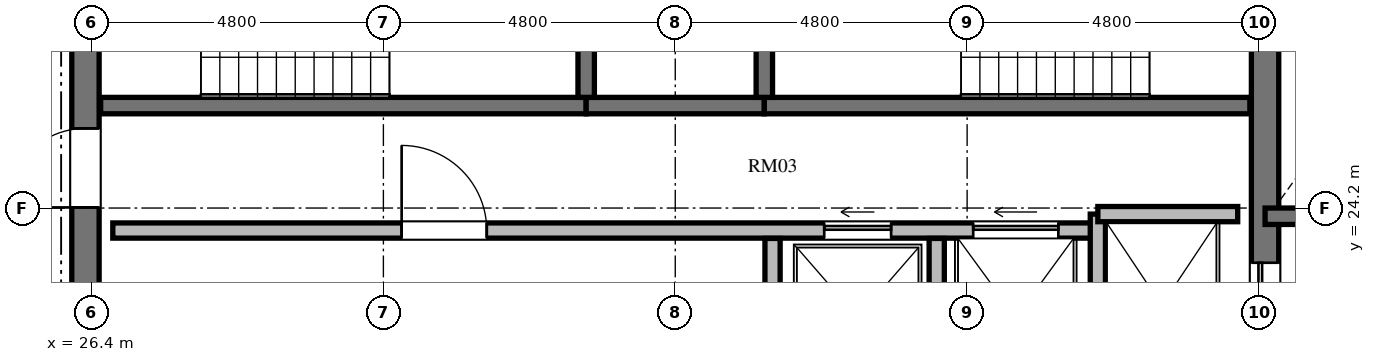
"""IFC4 building model, lengths in metres.
Left out: names, types, materials, properties, quantities, classifications, styles, units other than length and angle.
Written with IfcOpenShell. Run it as: python <this file> out.ifc"""

import sys

from ifc_helpers import new_model, si_unit, direction, frame, frame_2d, origin, place, context, subcontext, project, spatial, rectangle, extrude, element, fill, save


model = new_model("IFC4")
c1 = context("Model", 3, precision=1e-05, world=origin(), true_north=direction((0.0, 1.0)))
c2 = subcontext(c1, "Body", "Model", "MODEL_VIEW")
j1 = project(units=[si_unit("LENGTHUNIT", "METRE"), si_unit("PLANEANGLEUNIT", "RADIAN")], contexts=[c1])
p1 = place(None, origin())
s1 = spatial("IfcSite", under=j1, at=p1, CompositionType="ELEMENT")
p2 = place(p1, origin())
s2 = spatial("IfcBuilding", under=s1, at=p2, CompositionType="ELEMENT")
p3 = place(p2, frame((0.0, 0.0, 242.256)))
s3 = spatial("IfcBuildingStorey", under=s2, at=p3, CompositionType="ELEMENT", Elevation=242.256)
p4 = place(p3, frame((26.3, 20.95, 0.0), z_axis=(0.0, 0.0, 1.0), x_axis=(0.0, 1.0, 0.0)))
e1 = element("IfcWall", 1, at=p4, inside=s3, PredefinedType="SHEAR", context=c2, shape_type="SweptSolid", body=[
    extrude(rectangle(XDim=14.1, YDim=0.45, at=frame_2d((7.05, 0.0))), origin(), (0.0, 0.0, 1.0), 3.648),
])
p5 = place(p4, frame((6.5, 0.0, 0.0)))
e2 = element("IfcOpeningElement", 2, at=p5, cuts=e1, PredefinedType="OPENING", context=c2, shape_type="SweptSolid", body=[
    extrude(rectangle(XDim=1.2, YDim=2.15, at=frame_2d((0.6, 1.075))), frame((0.0, 0.235, 0.0), z_axis=(0.0, -1.0, 0.0), x_axis=(1.0, 0.0, 0.0)), (0.0, 0.0, 1.0), 0.47),
])
p6 = place(p4, frame((9.6, 0.0, 0.0)))
e3 = element("IfcOpeningElement", 3, at=p6, cuts=e1, PredefinedType="OPENING", context=c2, shape_type="SweptSolid", body=[
    extrude(rectangle(XDim=1.3, YDim=2.2, at=frame_2d((0.65, 1.1))), frame((0.0, 0.235, 0.0), z_axis=(0.0, -1.0, 0.0), x_axis=(1.0, 0.0, 0.0)), (0.0, 0.0, 1.0), 0.47),
])
p7 = place(p4, frame((3.26, 0.0, 0.0)))
e4 = element("IfcOpeningElement", 4, at=p7, cuts=e1, PredefinedType="OPENING", context=c2, shape_type="SweptSolid", body=[
    extrude(rectangle(XDim=1.3, YDim=2.2, at=frame_2d((0.65, 1.1))), frame((0.0, 0.235, 0.0), z_axis=(0.0, -1.0, 0.0), x_axis=(1.0, 0.0, 0.0)), (0.0, 0.0, 1.0), 0.47),
])
p8 = place(p3, frame((45.7, 20.95, 0.0), z_axis=(0.0, 0.0, 1.0), x_axis=(0.0, 1.0, 0.0)))
e5 = element("IfcWall", 5, at=p8, inside=s3, PredefinedType="SHEAR", context=c2, shape_type="SweptSolid", body=[
    extrude(rectangle(XDim=14.1, YDim=0.45, at=frame_2d((7.05, 0.0))), origin(), (0.0, 0.0, 1.0), 3.648),
])
p9 = place(p8, frame((11.75, 0.0, 0.0)))
e6 = element("IfcOpeningElement", 6, at=p9, cuts=e5, PredefinedType="OPENING", context=c2, shape_type="SweptSolid", body=[
    extrude(rectangle(XDim=1.4, YDim=2.3, at=frame_2d((0.7, 1.15))), frame((0.0, 0.235, 0.0), z_axis=(0.0, -1.0, 0.0), x_axis=(1.0, 0.0, 0.0)), (0.0, 0.0, 1.0), 0.47),
])
p10 = place(p8, frame((0.95, 0.0, 0.0)))
e7 = element("IfcOpeningElement", 7, at=p10, cuts=e5, PredefinedType="OPENING", context=c2, shape_type="SweptSolid", body=[
    extrude(rectangle(XDim=1.4, YDim=2.3, at=frame_2d((0.7, 1.15))), frame((0.0, 0.235, 0.0), z_axis=(0.0, -1.0, 0.0), x_axis=(1.0, 0.0, 0.0)), (0.0, 0.0, 1.0), 0.47),
])
p11 = place(p3, frame((26.55, 25.885, 0.0), z_axis=(0.0, 0.0, 1.0), x_axis=(1.0, 0.0, 0.0)))
e8 = element("IfcWall", 8, at=p11, inside=s3, PredefinedType="SHEAR", context=c2, shape_type="SweptSolid", body=[
    extrude(rectangle(XDim=7.985, YDim=0.27, at=frame_2d((3.992, 0.0))), origin(), (0.0, 0.0, 1.0), 3.648),
])
p12 = place(p3, frame((34.535, 25.885, 0.0), z_axis=(0.0, 0.0, 1.0), x_axis=(1.0, 0.0, 0.0)))
e9 = element("IfcWall", 9, at=p12, inside=s3, PredefinedType="SHEAR", context=c2, shape_type="SweptSolid", body=[
    extrude(rectangle(XDim=2.93, YDim=0.27, at=frame_2d((1.465, 0.0))), origin(), (0.0, 0.0, 1.0), 3.648),
])
p13 = place(p3, frame((37.465, 25.885, 0.0), z_axis=(0.0, 0.0, 1.0), x_axis=(1.0, 0.0, 0.0)))
e10 = element("IfcWall", 10, at=p13, inside=s3, PredefinedType="SHEAR", context=c2, shape_type="SweptSolid", body=[
    extrude(rectangle(XDim=7.985, YDim=0.27, at=frame_2d((3.992, 0.0))), origin(), (0.0, 0.0, 1.0), 3.648),
])
for number, where, z_axis, x_axis in (
    (11, (34.535, 26.02, 0.0), (0.0, 0.0, 1.0), (0.0, 1.0, 0.0)),
    (12, (37.465, 26.02, 0.0), (0.0, 0.0, 1.0), (0.0, 1.0, 0.0)),
):
    element("IfcWall", number, at=place(p3, frame(where, z_axis=z_axis, x_axis=x_axis)), inside=s3, PredefinedType="SHEAR", context=c2, shape_type="SweptSolid", body=[
        extrude(rectangle(XDim=4.08, YDim=0.27, at=frame_2d((2.04, 0.0))), origin(), (0.0, 0.0, 1.0), 3.648),
    ])
p14 = place(p3, frame((26.75, 23.83, 0.0), z_axis=(0.0, 0.0, 1.0), x_axis=(1.0, 0.0, 0.0)))
e13 = element("IfcWall", 13, at=p14, inside=s3, PredefinedType="SOLIDWALL", context=c2, shape_type="SweptSolid", body=[
    extrude(rectangle(XDim=16.2, YDim=0.25, at=frame_2d((8.1, 0.0))), origin(), (0.0, 0.0, 1.0), 3.198),
])
p15 = place(p14, frame((4.75, 0.0, 0.0)))
e14 = element("IfcOpeningElement", 14, at=p15, cuts=e13, PredefinedType="OPENING", context=c2, shape_type="SweptSolid", body=[
    extrude(rectangle(XDim=1.4, YDim=2.2, at=frame_2d((0.7, 1.1))), frame((0.0, 0.135, 0.0), z_axis=(0.0, -1.0, 0.0), x_axis=(1.0, 0.0, 0.0)), (0.0, 0.0, 1.0), 0.27),
])
p16 = place(p14, frame((11.7, 0.0, 0.0)))
e15 = element("IfcOpeningElement", 15, at=p16, cuts=e13, PredefinedType="OPENING", context=c2, shape_type="SweptSolid", body=[
    extrude(rectangle(XDim=1.1, YDim=2.2, at=frame_2d((0.55, 1.1))), frame((0.0, 0.135, 0.0), z_axis=(0.0, -1.0, 0.0), x_axis=(1.0, 0.0, 0.0)), (0.0, 0.0, 1.0), 0.27),
])
p17 = place(p14, frame((14.15, 0.0, 0.0)))
e16 = element("IfcOpeningElement", 16, at=p17, cuts=e13, PredefinedType="OPENING", context=c2, shape_type="SweptSolid", body=[
    extrude(rectangle(XDim=1.4, YDim=2.3, at=frame_2d((0.7, 1.15))), frame((0.0, 0.135, 0.0), z_axis=(0.0, -1.0, 0.0), x_axis=(1.0, 0.0, 0.0)), (0.0, 0.0, 1.0), 0.27),
])
p18 = place(p3, frame((42.95, 20.9, 0.0), z_axis=(0.0, 0.0, 1.0), x_axis=(0.0, 1.0, 0.0)))
e17 = element("IfcWall", 17, at=p18, inside=s3, PredefinedType="SOLIDWALL", context=c2, shape_type="SweptSolid", body=[
    extrude(rectangle(XDim=3.2, YDim=0.25, at=frame_2d((1.6, 0.0))), origin(), (0.0, 0.0, 1.0), 3.198),
])
p19 = place(p3, frame((42.95, 24.1, 0.0), z_axis=(0.0, 0.0, 1.0), x_axis=(1.0, 0.0, 0.0)))
e18 = element("IfcWall", 18, at=p19, inside=s3, PredefinedType="SOLIDWALL", context=c2, shape_type="SweptSolid", body=[
    extrude(rectangle(XDim=2.3, YDim=0.25, at=frame_2d((1.15, 0.0))), origin(), (0.0, 0.0, 1.0), 3.198),
])
for number, where, z_axis, x_axis in (
    (19, (37.6, 20.9, 0.0), (0.0, 0.0, 1.0), (0.0, 1.0, 0.0)),
    (20, (40.3, 20.9, 0.0), (0.0, 0.0, 1.0), (0.0, 1.0, 0.0)),
):
    element("IfcWall", number, at=place(p3, frame(where, z_axis=z_axis, x_axis=x_axis)), inside=s3, PredefinedType="SOLIDWALL", context=c2, shape_type="SweptSolid", body=[
        extrude(rectangle(XDim=2.8, YDim=0.25, at=frame_2d((1.4, 0.0))), origin(), (0.0, 0.0, 1.0), 3.198),
    ])
p20 = place(p3, frame((45.7, 24.065, 0.0), z_axis=(0.0, 0.0, 1.0), x_axis=(1.0, 0.0, 0.0)))
e21 = element("IfcWall", 21, at=p20, inside=s3, PredefinedType="SHEAR", context=c2, shape_type="SweptSolid", body=[
    extrude(rectangle(XDim=4.715, YDim=0.27, at=frame_2d((2.357, 0.0))), origin(), (0.0, 0.0, 1.0), 3.648),
])
p21 = place(p7, origin())
e22 = element("IfcDoor", 22, at=p21, inside=s3, OperationType="SINGLE_SWING_LEFT", PredefinedType="DOOR", context=c2, shape_type="SweptSolid", body=[
    extrude(rectangle(XDim=1.3, YDim=2.2, at=frame_2d((0.65, 1.1))), frame((0.0, 0.025, 0.0), z_axis=(0.0, -1.0, 0.0), x_axis=(1.0, 0.0, 0.0)), (0.0, 0.0, 1.0), 0.05),
])
fill(e4, e22)
p22 = place(p15, origin())
e23 = element("IfcDoor", 23, at=p22, inside=s3, OperationType="SINGLE_SWING_LEFT", PredefinedType="DOOR", context=c2, shape_type="SweptSolid", body=[
    extrude(rectangle(XDim=1.4, YDim=2.2, at=frame_2d((0.7, 1.1))), frame((0.0, 0.025, 0.0), z_axis=(0.0, -1.0, 0.0), x_axis=(1.0, 0.0, 0.0)), (0.0, 0.0, 1.0), 0.05),
])
fill(e14, e23)
p23 = place(p16, origin())
e24 = element("IfcDoor", 24, at=p23, inside=s3, OperationType="SLIDING_TO_LEFT", PredefinedType="DOOR", context=c2, shape_type="SweptSolid", body=[
    extrude(rectangle(XDim=1.1, YDim=2.2, at=frame_2d((0.55, 1.1))), frame((0.0, 0.025, 0.0), z_axis=(0.0, -1.0, 0.0), x_axis=(1.0, 0.0, 0.0)), (0.0, 0.0, 1.0), 0.05),
])
fill(e15, e24)
p24 = place(p10, origin())
e25 = element("IfcDoor", 25, at=p24, inside=s3, OperationType="SLIDING_TO_LEFT", PredefinedType="DOOR", context=c2, shape_type="SweptSolid", body=[
    extrude(rectangle(XDim=1.4, YDim=2.3, at=frame_2d((0.7, 1.15))), frame((0.0, 0.025, 0.0), z_axis=(0.0, -1.0, 0.0), x_axis=(1.0, 0.0, 0.0)), (0.0, 0.0, 1.0), 0.05),
])
fill(e7, e25)
p25 = place(p17, origin())
e26 = element("IfcDoor", 26, at=p25, inside=s3, OperationType="SLIDING_TO_LEFT", PredefinedType="DOOR", context=c2, shape_type="SweptSolid", body=[
    extrude(rectangle(XDim=1.4, YDim=2.3, at=frame_2d((0.7, 1.15))), frame((0.0, 0.025, 0.0), z_axis=(0.0, -1.0, 0.0), x_axis=(1.0, 0.0, 0.0)), (0.0, 0.0, 1.0), 0.05),
])
fill(e16, e26)
save(model, sys.argv[1])
